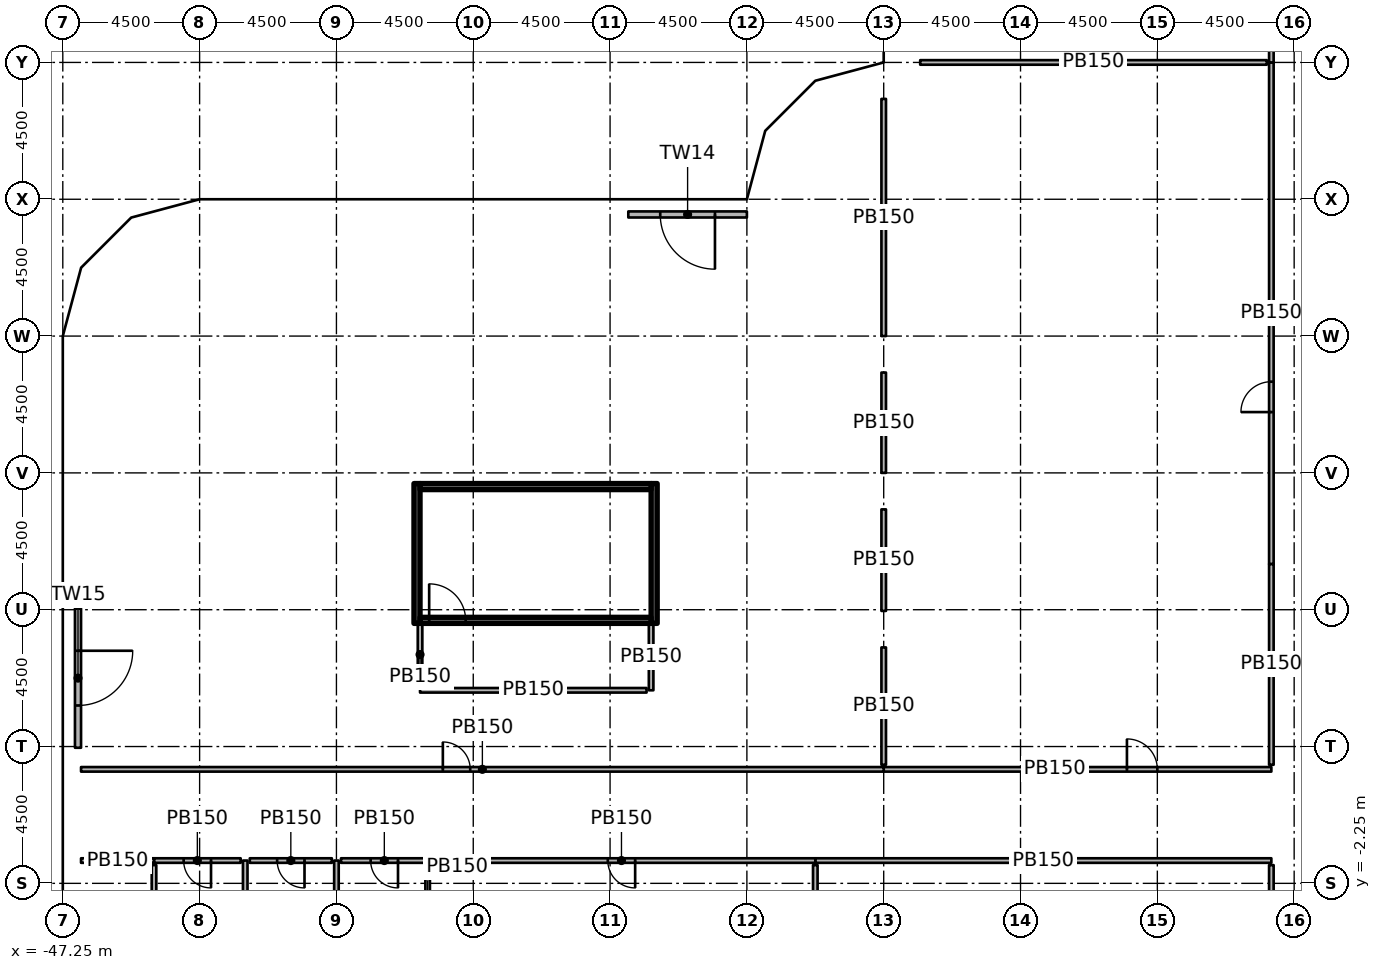
"""IFC4 building model, lengths in metres.
Left out: names, types, materials, properties, quantities, classifications, styles, units other than length and angle.
Written with IfcOpenShell. Run it as: python <this file> out.ifc"""

import sys

from ifc_helpers import new_model, si_unit, direction, frame, frame_2d, origin, origin_2d, place, context, subcontext, project, spatial, rectangle, extrude, element, fill, save


model = new_model("IFC4")
c1 = context("Model", 3, precision=1e-05, world=origin(), true_north=direction((0.0, 1.0)))
c2 = subcontext(c1, "Body", "Model", "MODEL_VIEW")
j1 = project(units=[si_unit("LENGTHUNIT", "METRE"), si_unit("PLANEANGLEUNIT", "RADIAN")], contexts=[c1])
p1 = place(None, origin())
s1 = spatial("IfcSite", under=j1, at=p1, CompositionType="ELEMENT")
p2 = place(p1, origin())
s2 = spatial("IfcBuilding", under=s1, at=p2, CompositionType="ELEMENT")
p3 = place(p2, frame((0.0, 0.0, 12.0)))
s3 = spatial("IfcBuildingStorey", under=s2, at=p3, CompositionType="ELEMENT", Elevation=12.0)
for number, where, z_axis, x_axis in (
    (1, (-46.65, -2.25, 0.0), (0.0, 0.0, 1.0), (1.0, 0.0, 0.0)),
    (2, (-46.65, 11.25, 0.0), (0.0, 0.0, 1.0), (1.0, 0.0, 0.0)),
    (3, (-42.15, 6.75, 0.0), (0.0, 0.0, 1.0), (1.0, 0.0, 0.0)),
    (4, (-42.75, 19.47, 0.0), (0.0, 0.0, 1.0), (1.0, 0.0, 0.0)),
    (5, (-37.65, 2.25, 0.0), (0.0, 0.0, 1.0), (1.0, 0.0, 0.0)),
    (6, (-38.25, 14.97, 0.0), (0.0, 0.0, 1.0), (1.0, 0.0, 0.0)),
    (7, (-33.11, -2.25, 0.0), (0.0, 0.0, 1.0), (1.0, 0.0, 0.0)),
    (8, (-33.11, 2.25, 0.0), (0.0, 0.0, 1.0), (1.0, 0.0, 0.0)),
    (9, (-28.908, 5.475, 0.0), (0.0, 0.0, 1.0), (1.0, 0.0, 0.0)),
    (10, (-29.25, 19.65, 0.0), (0.0, 0.0, 1.0), (1.0, 0.0, 0.0)),
    (11, (-24.75, 6.25, 0.0), (0.0, 0.0, 1.0), (1.0, 0.0, 0.0)),
    (12, (-24.75, 15.15, 0.0), (0.0, 0.0, 1.0), (1.0, 0.0, 0.0)),
    (13, (-24.15, 19.65, 0.0), (0.0, 0.0, 1.0), (1.0, 0.0, 0.0)),
    (14, (-20.25, 6.11, 0.0), (0.0, 0.0, 1.0), (1.0, 0.0, 0.0)),
    (15, (-20.25, 10.65, 0.0), (0.0, 0.0, 1.0), (1.0, 0.0, 0.0)),
    (16, (-19.65, 15.15, 0.0), (0.0, 0.0, 1.0), (1.0, 0.0, 0.0)),
    (17, (-19.65, 24.15, 0.0), (0.0, 0.0, 1.0), (1.0, 0.0, 0.0)),
    (18, (-15.75, 6.25, 0.0), (0.0, 0.0, 1.0), (1.0, 0.0, 0.0)),
    (19, (-15.15, 10.65, 0.0), (0.0, 0.0, 1.0), (1.0, 0.0, 0.0)),
    (20, (-15.15, 19.65, 0.0), (0.0, 0.0, 1.0), (1.0, 0.0, 0.0)),
    (21, (-10.75, 6.25, 0.0), (0.0, 0.0, 1.0), (1.0, 0.0, 0.0)),
    (22, (-10.65, 15.15, 0.0), (0.0, 0.0, 1.0), (1.0, 0.0, 0.0)),
    (23, (-6.25, 6.25, 0.0), (0.0, 0.0, 1.0), (1.0, 0.0, 0.0)),
    (24, (-6.25, 10.75, 0.0), (0.0, 0.0, 1.0), (1.0, 0.0, 0.0)),
    (25, (-6.25, 15.75, 0.0), (0.0, 0.0, 1.0), (1.0, 0.0, 0.0)),
    (26, (-6.25, 20.25, 0.0), (0.0, 0.0, 1.0), (1.0, 0.0, 0.0)),
    (27, (-6.25, 24.65, 0.0), (0.0, 0.0, 1.0), (1.0, 0.0, 0.0)),
):
    element("IfcColumn", number, at=place(p3, frame(where, z_axis=z_axis, x_axis=x_axis)), inside=s3, PredefinedType="COLUMN", context=c2, shape_type="SweptSolid", body=[
        extrude(rectangle(XDim=1.2, YDim=1.2, at=origin_2d()), origin(), (0.0, 0.0, 1.0), 4.55),
    ])
p4 = place(p3, frame((-24.75, 19.75, 0.0), z_axis=(0.0, 0.0, 1.0), x_axis=(-1.0, 0.0, 0.0)))
e28 = element("IfcWall", 28, at=p4, inside=s3, PredefinedType="SOLIDWALL", context=c2, shape_type="SweptSolid", body=[
    extrude(rectangle(XDim=3.9, YDim=0.2, at=frame_2d((1.95, 0.0))), origin(), (0.0, 0.0, 1.0), 4.55),
])
p5 = place(p4, frame((1.05, 0.0, 0.0)))
e29 = element("IfcOpeningElement", 29, at=p5, cuts=e28, PredefinedType="OPENING", context=c2, shape_type="SweptSolid", body=[
    extrude(rectangle(XDim=1.8, YDim=2.4, at=frame_2d((0.9, 1.2))), frame((0.0, 0.11, 0.0), z_axis=(0.0, -1.0, 0.0), x_axis=(1.0, 0.0, 0.0)), (0.0, 0.0, 1.0), 0.22),
])
p6 = place(p3, frame((-46.75, 6.79, 0.0), z_axis=(0.0, 0.0, 1.0), x_axis=(0.0, -1.0, 0.0)))
e30 = element("IfcWall", 30, at=p6, inside=s3, PredefinedType="SOLIDWALL", context=c2, shape_type="SweptSolid", body=[
    extrude(rectangle(XDim=4.58, YDim=0.2, at=frame_2d((2.29, 0.0))), origin(), (0.0, 0.0, 1.0), 4.55),
])
p7 = place(p6, frame((1.39, 0.0, 0.0)))
e31 = element("IfcOpeningElement", 31, at=p7, cuts=e30, PredefinedType="OPENING", context=c2, shape_type="SweptSolid", body=[
    extrude(rectangle(XDim=1.8, YDim=2.4, at=frame_2d((0.9, 1.2))), frame((0.0, 0.11, 0.0), z_axis=(0.0, -1.0, 0.0), x_axis=(1.0, 0.0, 0.0)), (0.0, 0.0, 1.0), 0.22),
])
for number, where, z_axis, x_axis in (
    (32, (-35.6, 6.3, 0.0), (0.0, 0.0, 1.0), (0.0, 1.0, 0.0)),
    (33, (-27.8, 6.3, 0.0), (0.0, 0.0, 1.0), (0.0, 1.0, 0.0)),
):
    element("IfcWall", number, at=place(p3, frame(where, z_axis=z_axis, x_axis=x_axis)), inside=s3, PredefinedType="SHEAR", context=c2, shape_type="SweptSolid", body=[
        extrude(rectangle(XDim=4.6, YDim=0.2, at=frame_2d((2.3, 0.0))), origin(), (0.0, 0.0, 1.0), 4.55),
    ])
p8 = place(p3, frame((-35.5, 6.4, 0.0), z_axis=(0.0, 0.0, 1.0), x_axis=(1.0, 0.0, 0.0)))
e34 = element("IfcWall", 34, at=p8, inside=s3, PredefinedType="SHEAR", context=c2, shape_type="SweptSolid", body=[
    extrude(rectangle(XDim=7.6, YDim=0.2, at=frame_2d((3.8, 0.0))), origin(), (0.0, 0.0, 1.0), 4.55),
])
p9 = place(p8, frame((0.3, 0.0, 0.0)))
e35 = element("IfcOpeningElement", 35, at=p9, cuts=e34, PredefinedType="OPENING", context=c2, shape_type="SweptSolid", body=[
    extrude(rectangle(XDim=1.2, YDim=2.1, at=frame_2d((0.6, 1.05))), frame((0.0, 0.11, 0.0), z_axis=(0.0, -1.0, 0.0), x_axis=(1.0, 0.0, 0.0)), (0.0, 0.0, 1.0), 0.22),
])
p10 = place(p3, frame((-35.5, 10.8, 0.0), z_axis=(0.0, 0.0, 1.0), x_axis=(1.0, 0.0, 0.0)))
e36 = element("IfcWall", 36, at=p10, inside=s3, PredefinedType="SHEAR", context=c2, shape_type="SweptSolid", body=[
    extrude(rectangle(XDim=7.6, YDim=0.2, at=frame_2d((3.8, 0.0))), origin(), (0.0, 0.0, 1.0), 4.55),
])
p11 = place(p3, frame((-27.9, 6.3, 0.0), z_axis=(0.0, 0.0, 1.0), x_axis=(0.0, -1.0, 0.0)))
e37 = element("IfcWall", 37, at=p11, inside=s3, PredefinedType="PARTITIONING", context=c2, shape_type="SweptSolid", body=[
    extrude(rectangle(XDim=2.2, YDim=0.15, at=frame_2d((1.1, 0.0))), origin(), (0.0, 0.0, 1.0), 4.55),
])
p12 = place(p3, frame((-28.05, 4.1, 0.0), z_axis=(0.0, 0.0, 1.0), x_axis=(-1.0, 0.0, 0.0)))
e38 = element("IfcWall", 38, at=p12, inside=s3, PredefinedType="PARTITIONING", context=c2, shape_type="SweptSolid", body=[
    extrude(rectangle(XDim=7.45, YDim=0.15, at=frame_2d((3.725, 0.0))), origin(), (0.0, 0.0, 1.0), 4.55),
])
p13 = place(p3, frame((-35.5, 4.25, 0.0), z_axis=(0.0, 0.0, 1.0), x_axis=(0.0, 1.0, 0.0)))
e39 = element("IfcWall", 39, at=p13, inside=s3, PredefinedType="PARTITIONING", context=c2, shape_type="SweptSolid", body=[
    extrude(rectangle(XDim=2.05, YDim=0.15, at=frame_2d((1.025, 0.0))), origin(), (0.0, 0.0, 1.0), 4.55),
])
p14 = place(p3, frame((-41.25, -1.5, 0.0), z_axis=(0.0, 0.0, 1.0), x_axis=(0.0, -1.0, 0.0)))
e40 = element("IfcWall", 40, at=p14, inside=s3, PredefinedType="PARTITIONING", context=c2, shape_type="SweptSolid", body=[
    extrude(rectangle(XDim=6.0, YDim=0.15, at=frame_2d((3.0, 0.0))), origin(), (0.0, 0.0, 1.0), 4.55),
])
p15 = place(p3, frame((-41.4, -1.5, 0.0), z_axis=(0.0, 0.0, 1.0), x_axis=(-1.0, 0.0, 0.0)))
e41 = element("IfcWall", 41, at=p15, inside=s3, PredefinedType="PARTITIONING", context=c2, shape_type="SweptSolid", body=[
    extrude(rectangle(XDim=2.85, YDim=0.15, at=frame_2d((1.425, 0.0))), origin(), (0.0, 0.0, 1.0), 4.55),
])
p16 = place(p15, frame((0.975, 0.0, 0.0)))
e42 = element("IfcOpeningElement", 42, at=p16, cuts=e41, PredefinedType="OPENING", context=c2, shape_type="SweptSolid", body=[
    extrude(rectangle(XDim=0.9, YDim=2.1, at=frame_2d((0.45, 1.05))), frame((0.0, 0.085, 0.0), z_axis=(0.0, -1.0, 0.0), x_axis=(1.0, 0.0, 0.0)), (0.0, 0.0, 1.0), 0.17),
])
p17 = place(p3, frame((-44.25, -7.35, 0.0), z_axis=(0.0, 0.0, 1.0), x_axis=(0.0, 1.0, 0.0)))
e43 = element("IfcWall", 43, at=p17, inside=s3, PredefinedType="PARTITIONING", context=c2, shape_type="SweptSolid", body=[
    extrude(rectangle(XDim=5.7, YDim=0.15, at=frame_2d((2.85, 0.0))), origin(), (0.0, 0.0, 1.0), 4.55),
])
p18 = place(p3, frame((-38.25, -1.5, 0.0), z_axis=(0.0, 0.0, 1.0), x_axis=(0.0, -1.0, 0.0)))
e44 = element("IfcWall", 44, at=p18, inside=s3, PredefinedType="PARTITIONING", context=c2, shape_type="SweptSolid", body=[
    extrude(rectangle(XDim=6.0, YDim=0.15, at=frame_2d((3.0, 0.0))), origin(), (0.0, 0.0, 1.0), 4.55),
])
p19 = place(p3, frame((-38.4, -1.5, 0.0), z_axis=(0.0, 0.0, 1.0), x_axis=(-1.0, 0.0, 0.0)))
e45 = element("IfcWall", 45, at=p19, inside=s3, PredefinedType="PARTITIONING", context=c2, shape_type="SweptSolid", body=[
    extrude(rectangle(XDim=2.7, YDim=0.15, at=frame_2d((1.35, 0.0))), origin(), (0.0, 0.0, 1.0), 4.55),
])
p20 = place(p19, frame((0.9, 0.0, 0.0)))
e46 = element("IfcOpeningElement", 46, at=p20, cuts=e45, PredefinedType="OPENING", context=c2, shape_type="SweptSolid", body=[
    extrude(rectangle(XDim=0.9, YDim=2.1, at=frame_2d((0.45, 1.05))), frame((0.0, 0.085, 0.0), z_axis=(0.0, -1.0, 0.0), x_axis=(1.0, 0.0, 0.0)), (0.0, 0.0, 1.0), 0.17),
])
p21 = place(p3, frame((-35.25, -1.5, 0.0), z_axis=(0.0, 0.0, 1.0), x_axis=(-1.0, 0.0, 0.0)))
e47 = element("IfcWall", 47, at=p21, inside=s3, PredefinedType="PARTITIONING", context=c2, shape_type="SweptSolid", body=[
    extrude(rectangle(XDim=2.85, YDim=0.15, at=frame_2d((1.425, 0.0))), origin(), (0.0, 0.0, 1.0), 4.55),
])
p22 = place(p21, frame((0.975, 0.0, 0.0)))
e48 = element("IfcOpeningElement", 48, at=p22, cuts=e47, PredefinedType="OPENING", context=c2, shape_type="SweptSolid", body=[
    extrude(rectangle(XDim=0.9, YDim=2.1, at=frame_2d((0.45, 1.05))), frame((0.0, 0.085, 0.0), z_axis=(0.0, -1.0, 0.0), x_axis=(1.0, 0.0, 0.0)), (0.0, 0.0, 1.0), 0.17),
])
p23 = place(p3, frame((-35.25, -1.65, 0.0), z_axis=(0.0, 0.0, 1.0), x_axis=(0.0, -1.0, 0.0)))
e49 = element("IfcWall", 49, at=p23, inside=s3, PredefinedType="PARTITIONING", context=c2, shape_type="SweptSolid", body=[
    extrude(rectangle(XDim=2.1, YDim=0.15, at=frame_2d((1.05, 0.0))), origin(), (0.0, 0.0, 1.0), 4.55),
])
p24 = place(p3, frame((-7.5, 8.25, 0.0), z_axis=(0.0, 0.0, 1.0), x_axis=(0.0, 1.0, 0.0)))
e50 = element("IfcWall", 50, at=p24, inside=s3, PredefinedType="PARTITIONING", context=c2, shape_type="SweptSolid", body=[
    extrude(rectangle(XDim=16.5, YDim=0.15, at=frame_2d((8.25, 0.0))), origin(), (0.0, 0.0, 1.0), 4.55),
])
p25 = place(p24, frame((5.0, 0.0, 0.0)))
e51 = element("IfcOpeningElement", 51, at=p25, cuts=e50, PredefinedType="OPENING", context=c2, shape_type="SweptSolid", body=[
    extrude(rectangle(XDim=1.0, YDim=2.1, at=frame_2d((0.5, 1.05))), frame((0.0, 0.085, 0.0), z_axis=(0.0, -1.0, 0.0), x_axis=(1.0, 0.0, 0.0)), (0.0, 0.0, 1.0), 0.17),
])
p26 = place(p3, frame((-7.5, 24.75, 0.0), z_axis=(0.0, 0.0, 1.0), x_axis=(0.0, 1.0, 0.0)))
e52 = element("IfcWall", 52, at=p26, inside=s3, PredefinedType="PARTITIONING", context=c2, shape_type="SweptSolid", body=[
    extrude(rectangle(XDim=5.25, YDim=0.15, at=frame_2d((2.625, 0.0))), origin(), (0.0, 0.0, 1.0), 4.55),
])
p27 = place(p26, frame((2.75, 0.0, 0.0)))
e53 = element("IfcOpeningElement", 53, at=p27, cuts=e52, PredefinedType="OPENING", context=c2, shape_type="SweptSolid", body=[
    extrude(rectangle(XDim=0.9, YDim=2.1, at=frame_2d((0.45, 1.05))), frame((0.0, 0.085, 0.0), z_axis=(0.0, -1.0, 0.0), x_axis=(1.0, 0.0, 0.0)), (0.0, 0.0, 1.0), 0.17),
])
p28 = place(p3, frame((-20.25, 1.5, 0.0), z_axis=(0.0, 0.0, 1.0), x_axis=(1.0, 0.0, 0.0)))
e54 = element("IfcWall", 54, at=p28, inside=s3, PredefinedType="PARTITIONING", context=c2, shape_type="SweptSolid", body=[
    extrude(rectangle(XDim=12.75, YDim=0.15, at=frame_2d((6.375, 0.0))), origin(), (0.0, 0.0, 1.0), 4.55),
])
p29 = place(p28, frame((8.0, 0.0, 0.0)))
e55 = element("IfcOpeningElement", 55, at=p29, cuts=e54, PredefinedType="OPENING", context=c2, shape_type="SweptSolid", body=[
    extrude(rectangle(XDim=1.0, YDim=2.1, at=frame_2d((0.5, 1.05))), frame((0.0, 0.085, 0.0), z_axis=(0.0, -1.0, 0.0), x_axis=(1.0, 0.0, 0.0)), (0.0, 0.0, 1.0), 0.17),
])
p30 = place(p3, frame((-46.65, 1.5, 0.0), z_axis=(0.0, 0.0, 1.0), x_axis=(1.0, 0.0, 0.0)))
e56 = element("IfcWall", 56, at=p30, inside=s3, PredefinedType="PARTITIONING", context=c2, shape_type="SweptSolid", body=[
    extrude(rectangle(XDim=26.4, YDim=0.15, at=frame_2d((13.2, 0.0))), origin(), (0.0, 0.0, 1.0), 4.55),
])
p31 = place(p30, frame((11.9, 0.0, 0.0)))
e57 = element("IfcOpeningElement", 57, at=p31, cuts=e56, PredefinedType="OPENING", context=c2, shape_type="SweptSolid", body=[
    extrude(rectangle(XDim=0.9, YDim=2.1, at=frame_2d((0.45, 1.05))), frame((0.0, 0.085, 0.0), z_axis=(0.0, -1.0, 0.0), x_axis=(1.0, 0.0, 0.0)), (0.0, 0.0, 1.0), 0.17),
])
p32 = place(p3, frame((-7.5, -1.5, 0.0), z_axis=(0.0, 0.0, 1.0), x_axis=(-1.0, 0.0, 0.0)))
e58 = element("IfcWall", 58, at=p32, inside=s3, PredefinedType="PARTITIONING", context=c2, shape_type="SweptSolid", body=[
    extrude(rectangle(XDim=15.0, YDim=0.15, at=frame_2d((7.5, 0.0))), origin(), (0.0, 0.0, 1.0), 4.55),
])
p33 = place(p3, frame((-44.25, -1.5, 0.0), z_axis=(0.0, 0.0, 1.0), x_axis=(-1.0, 0.0, 0.0)))
e59 = element("IfcWall", 59, at=p33, inside=s3, PredefinedType="PARTITIONING", context=c2, shape_type="SweptSolid", body=[
    extrude(rectangle(XDim=2.4, YDim=0.15, at=frame_2d((1.2, 0.0))), origin(), (0.0, 0.0, 1.0), 4.55),
])
p34 = place(p3, frame((-22.5, -1.5, 0.0), z_axis=(0.0, 0.0, 1.0), x_axis=(-1.0, 0.0, 0.0)))
e60 = element("IfcWall", 60, at=p34, inside=s3, PredefinedType="PARTITIONING", context=c2, shape_type="SweptSolid", body=[
    extrude(rectangle(XDim=12.75, YDim=0.15, at=frame_2d((6.375, 0.0))), origin(), (0.0, 0.0, 1.0), 4.55),
])
p35 = place(p34, frame((5.925, 0.0, 0.0)))
e61 = element("IfcOpeningElement", 61, at=p35, cuts=e60, PredefinedType="OPENING", context=c2, shape_type="SweptSolid", body=[
    extrude(rectangle(XDim=0.9, YDim=2.1, at=frame_2d((0.45, 1.05))), frame((0.0, 0.085, 0.0), z_axis=(0.0, -1.0, 0.0), x_axis=(1.0, 0.0, 0.0)), (0.0, 0.0, 1.0), 0.17),
])
p36 = place(p3, frame((-20.25, 1.65, 0.0), z_axis=(0.0, 0.0, 1.0), x_axis=(0.0, 1.0, 0.0)))
e62 = element("IfcWall", 62, at=p36, inside=s3, PredefinedType="PARTITIONING", context=c2, shape_type="SweptSolid", body=[
    extrude(rectangle(XDim=3.86, YDim=0.15, at=frame_2d((1.93, 0.0))), origin(), (0.0, 0.0, 1.0), 4.55),
])
p37 = place(p3, frame((-20.25, 6.71, 0.0), z_axis=(0.0, 0.0, 1.0), x_axis=(0.0, 1.0, 0.0)))
e63 = element("IfcWall", 63, at=p37, inside=s3, PredefinedType="PARTITIONING", context=c2, shape_type="SweptSolid", body=[
    extrude(rectangle(XDim=3.34, YDim=0.15, at=frame_2d((1.67, 0.0))), origin(), (0.0, 0.0, 1.0), 4.55),
])
p38 = place(p3, frame((-20.25, 11.25, 0.0), z_axis=(0.0, 0.0, 1.0), x_axis=(0.0, 1.0, 0.0)))
e64 = element("IfcWall", 64, at=p38, inside=s3, PredefinedType="PARTITIONING", context=c2, shape_type="SweptSolid", body=[
    extrude(rectangle(XDim=3.3, YDim=0.15, at=frame_2d((1.65, 0.0))), origin(), (0.0, 0.0, 1.0), 4.55),
])
p39 = place(p3, frame((-20.25, 15.75, 0.0), z_axis=(0.0, 0.0, 1.0), x_axis=(0.0, 1.0, 0.0)))
e65 = element("IfcWall", 65, at=p39, inside=s3, PredefinedType="PARTITIONING", context=c2, shape_type="SweptSolid", body=[
    extrude(rectangle(XDim=7.8, YDim=0.15, at=frame_2d((3.9, 0.0))), origin(), (0.0, 0.0, 1.0), 4.55),
])
p40 = place(p3, frame((-19.05, 24.75, 0.0), z_axis=(0.0, 0.0, 1.0), x_axis=(1.0, 0.0, 0.0)))
e66 = element("IfcWall", 66, at=p40, inside=s3, PredefinedType="PARTITIONING", context=c2, shape_type="SweptSolid", body=[
    extrude(rectangle(XDim=11.4, YDim=0.15, at=frame_2d((5.7, 0.0))), origin(), (0.0, 0.0, 1.0), 4.55),
])
p41 = place(p3, frame((-7.5, 8.25, 0.0), z_axis=(0.0, 0.0, 1.0), x_axis=(0.0, -1.0, 0.0)))
e67 = element("IfcWall", 67, at=p41, inside=s3, PredefinedType="PARTITIONING", context=c2, shape_type="SweptSolid", body=[
    extrude(rectangle(XDim=6.6, YDim=0.15, at=frame_2d((3.3, 0.0))), origin(), (0.0, 0.0, 1.0), 4.55),
])
p42 = place(p3, frame((-22.5, -23.297, 0.0), z_axis=(0.0, 0.0, 1.0), x_axis=(0.0, 1.0, 0.0)))
e68 = element("IfcWall", 68, at=p42, inside=s3, PredefinedType="PARTITIONING", context=c2, shape_type="SweptSolid", body=[
    extrude(rectangle(XDim=21.647, YDim=0.15, at=frame_2d((10.824, 0.0))), origin(), (0.0, 0.0, 1.0), 4.55),
])
p43 = place(p3, frame((-7.5, -1.65, 0.0), z_axis=(0.0, 0.0, 1.0), x_axis=(0.0, -1.0, 0.0)))
e69 = element("IfcWall", 69, at=p43, inside=s3, PredefinedType="PARTITIONING", context=c2, shape_type="SweptSolid", body=[
    extrude(rectangle(XDim=6.6, YDim=0.15, at=frame_2d((3.3, 0.0))), origin(), (0.0, 0.0, 1.0), 4.55),
])
p44 = place(p5, origin())
e70 = element("IfcDoor", 70, at=p44, inside=s3, OperationType="SINGLE_SWING_LEFT", PredefinedType="DOOR", context=c2, shape_type="SweptSolid", body=[
    extrude(rectangle(XDim=1.8, YDim=2.4, at=frame_2d((0.9, 1.2))), frame((0.0, 0.025, 0.0), z_axis=(0.0, -1.0, 0.0), x_axis=(1.0, 0.0, 0.0)), (0.0, 0.0, 1.0), 0.05),
])
fill(e29, e70)
p45 = place(p7, origin())
e71 = element("IfcDoor", 71, at=p45, inside=s3, OperationType="SINGLE_SWING_LEFT", PredefinedType="DOOR", context=c2, shape_type="SweptSolid", body=[
    extrude(rectangle(XDim=1.8, YDim=2.4, at=frame_2d((0.9, 1.2))), frame((0.0, 0.025, 0.0), z_axis=(0.0, -1.0, 0.0), x_axis=(1.0, 0.0, 0.0)), (0.0, 0.0, 1.0), 0.05),
])
fill(e31, e71)
p46 = place(p9, origin())
e72 = element("IfcDoor", 72, at=p46, inside=s3, OperationType="SINGLE_SWING_RIGHT", PredefinedType="DOOR", context=c2, shape_type="SweptSolid", body=[
    extrude(rectangle(XDim=1.2, YDim=2.1, at=frame_2d((0.6, 1.05))), frame((0.0, 0.025, 0.0), z_axis=(0.0, -1.0, 0.0), x_axis=(1.0, 0.0, 0.0)), (0.0, 0.0, 1.0), 0.05),
])
fill(e35, e72)
p47 = place(p16, origin())
e73 = element("IfcDoor", 73, at=p47, inside=s3, OperationType="SINGLE_SWING_LEFT", PredefinedType="DOOR", context=c2, shape_type="SweptSolid", body=[
    extrude(rectangle(XDim=0.9, YDim=2.1, at=frame_2d((0.45, 1.05))), frame((0.0, 0.025, 0.0), z_axis=(0.0, -1.0, 0.0), x_axis=(1.0, 0.0, 0.0)), (0.0, 0.0, 1.0), 0.05),
])
fill(e42, e73)
p48 = place(p20, origin())
e74 = element("IfcDoor", 74, at=p48, inside=s3, OperationType="SINGLE_SWING_LEFT", PredefinedType="DOOR", context=c2, shape_type="SweptSolid", body=[
    extrude(rectangle(XDim=0.9, YDim=2.1, at=frame_2d((0.45, 1.05))), frame((0.0, 0.025, 0.0), z_axis=(0.0, -1.0, 0.0), x_axis=(1.0, 0.0, 0.0)), (0.0, 0.0, 1.0), 0.05),
])
fill(e46, e74)
p49 = place(p22, origin())
e75 = element("IfcDoor", 75, at=p49, inside=s3, OperationType="SINGLE_SWING_LEFT", PredefinedType="DOOR", context=c2, shape_type="SweptSolid", body=[
    extrude(rectangle(XDim=0.9, YDim=2.1, at=frame_2d((0.45, 1.05))), frame((0.0, 0.025, 0.0), z_axis=(0.0, -1.0, 0.0), x_axis=(1.0, 0.0, 0.0)), (0.0, 0.0, 1.0), 0.05),
])
fill(e48, e75)
p50 = place(p25, origin())
e76 = element("IfcDoor", 76, at=p50, inside=s3, OperationType="SINGLE_SWING_LEFT", PredefinedType="DOOR", context=c2, shape_type="SweptSolid", body=[
    extrude(rectangle(XDim=1.0, YDim=2.1, at=frame_2d((0.5, 1.05))), frame((0.0, 0.025, 0.0), z_axis=(0.0, -1.0, 0.0), x_axis=(1.0, 0.0, 0.0)), (0.0, 0.0, 1.0), 0.05),
])
fill(e51, e76)
p51 = place(p29, origin())
e77 = element("IfcDoor", 77, at=p51, inside=s3, OperationType="SINGLE_SWING_LEFT", PredefinedType="DOOR", context=c2, shape_type="SweptSolid", body=[
    extrude(rectangle(XDim=1.0, YDim=2.1, at=frame_2d((0.5, 1.05))), frame((0.0, 0.025, 0.0), z_axis=(0.0, -1.0, 0.0), x_axis=(1.0, 0.0, 0.0)), (0.0, 0.0, 1.0), 0.05),
])
fill(e55, e77)
p52 = place(p31, origin())
e78 = element("IfcDoor", 78, at=p52, inside=s3, OperationType="SINGLE_SWING_LEFT", PredefinedType="DOOR", context=c2, shape_type="SweptSolid", body=[
    extrude(rectangle(XDim=0.9, YDim=2.1, at=frame_2d((0.45, 1.05))), frame((0.0, 0.025, 0.0), z_axis=(0.0, -1.0, 0.0), x_axis=(1.0, 0.0, 0.0)), (0.0, 0.0, 1.0), 0.05),
])
fill(e57, e78)
p53 = place(p35, origin())
e79 = element("IfcDoor", 79, at=p53, inside=s3, OperationType="SINGLE_SWING_LEFT", PredefinedType="DOOR", context=c2, shape_type="SweptSolid", body=[
    extrude(rectangle(XDim=0.9, YDim=2.1, at=frame_2d((0.45, 1.05))), frame((0.0, 0.025, 0.0), z_axis=(0.0, -1.0, 0.0), x_axis=(1.0, 0.0, 0.0)), (0.0, 0.0, 1.0), 0.05),
])
fill(e61, e79)
save(model, sys.argv[1])
